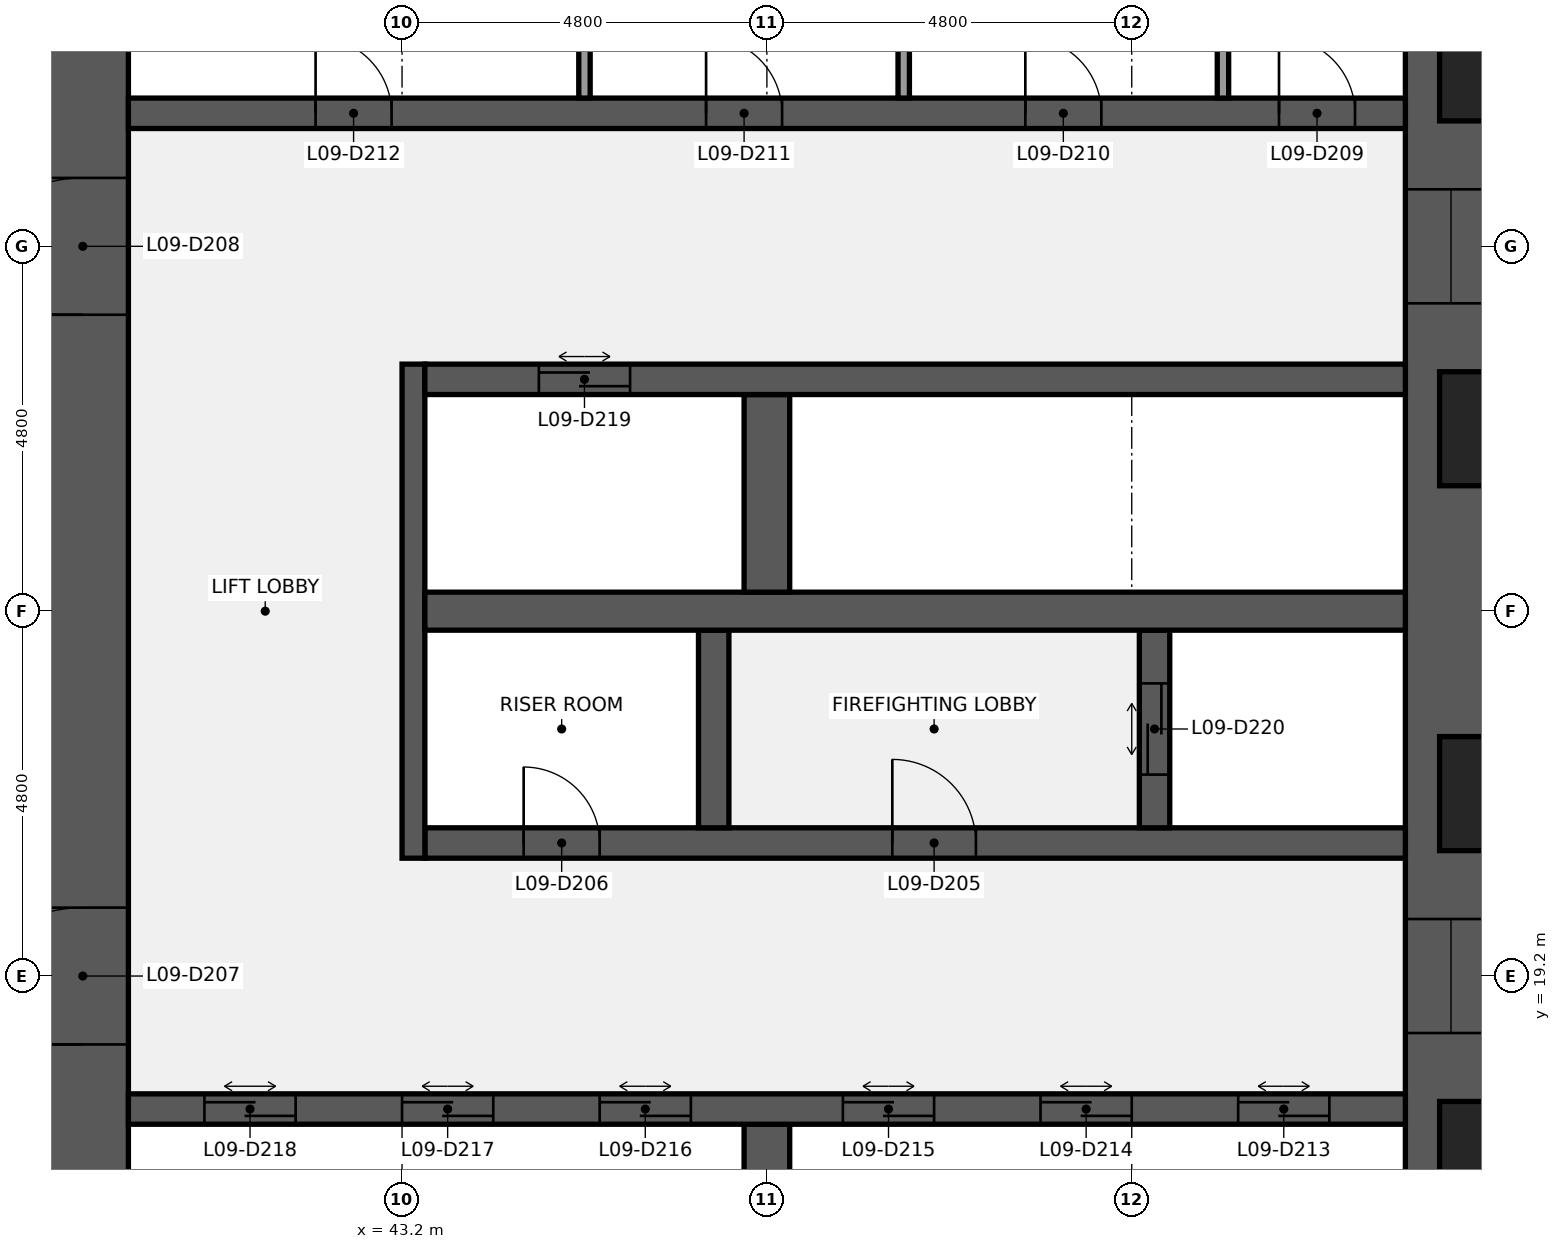
"""IFC4 building model, lengths in metres.
Left out: names, types, materials, properties, quantities, classifications, styles, units other than length and angle.
Written with IfcOpenShell. Run it as: python <this file> out.ifc"""

import sys

from ifc_helpers import new_model, si_unit, direction, frame, frame_2d, origin, place, context, subcontext, project, spatial, rectangle, extrude, element, fill, save


model = new_model("IFC4")
c1 = context("Model", 3, precision=1e-05, world=origin(), true_north=direction((0.0, 1.0)))
c2 = subcontext(c1, "Body", "Model", "MODEL_VIEW")
j1 = project(units=[si_unit("LENGTHUNIT", "METRE"), si_unit("PLANEANGLEUNIT", "RADIAN")], contexts=[c1])
p1 = place(None, origin())
s1 = spatial("IfcSite", under=j1, at=p1, CompositionType="ELEMENT")
p2 = place(p1, origin())
s2 = spatial("IfcBuilding", under=s1, at=p2, CompositionType="ELEMENT")
p3 = place(p2, frame((0.0, 0.0, 47.0)))
s3 = spatial("IfcBuildingStorey", under=s2, at=p3, CompositionType="ELEMENT", Elevation=47.0)
p4 = place(p3, frame((57.0, 38.4, 0.0), z_axis=(0.0, 0.0, 1.0), x_axis=(0.0, -1.0, 0.0)))
e1 = element("IfcWall", 1, at=p4, inside=s3, PredefinedType="SHEAR", context=c2, shape_type="SweptSolid", body=[
    extrude(rectangle(XDim=28.8, YDim=1.2, at=frame_2d((14.4, 0.0))), origin(), (0.0, 0.0, 1.0), 3.84),
])
p5 = place(p4, frame((18.45, 0.0, 0.9)))
e2 = element("IfcOpeningElement", 2, at=p5, cuts=e1, PredefinedType="OPENING", context=c2, shape_type="SweptSolid", body=[
    extrude(rectangle(XDim=1.5, YDim=1.5, at=frame_2d((0.75, 0.75))), frame((0.0, 0.61, 0.0), z_axis=(0.0, -1.0, 0.0), x_axis=(1.0, 0.0, 0.0)), (0.0, 0.0, 1.0), 1.22),
])
p6 = place(p4, frame((8.85, 0.0, 0.9)))
e3 = element("IfcOpeningElement", 3, at=p6, cuts=e1, PredefinedType="OPENING", context=c2, shape_type="SweptSolid", body=[
    extrude(rectangle(XDim=1.5, YDim=1.5, at=frame_2d((0.75, 0.75))), frame((0.0, 0.61, 0.0), z_axis=(0.0, -1.0, 0.0), x_axis=(1.0, 0.0, 0.0)), (0.0, 0.0, 1.0), 1.22),
])
p7 = place(p3, frame((39.0, 9.6, 0.0), z_axis=(0.0, 0.0, 1.0), x_axis=(0.0, 1.0, 0.0)))
e4 = element("IfcWall", 4, at=p7, inside=s3, PredefinedType="SHEAR", context=c2, shape_type="SweptSolid", body=[
    extrude(rectangle(XDim=28.8, YDim=1.2, at=frame_2d((14.4, 0.0))), origin(), (0.0, 0.0, 1.0), 3.84),
])
p8 = place(p7, frame((8.7, 0.0, 0.0)))
e5 = element("IfcOpeningElement", 5, at=p8, cuts=e4, PredefinedType="OPENING", context=c2, shape_type="SweptSolid", body=[
    extrude(rectangle(XDim=1.8, YDim=2.1, at=frame_2d((0.9, 1.05))), frame((0.0, 0.61, 0.0), z_axis=(0.0, -1.0, 0.0), x_axis=(1.0, 0.0, 0.0)), (0.0, 0.0, 1.0), 1.22),
])
p9 = place(p7, frame((18.3, 0.0, 0.0)))
e6 = element("IfcOpeningElement", 6, at=p9, cuts=e4, PredefinedType="OPENING", context=c2, shape_type="SweptSolid", body=[
    extrude(rectangle(XDim=1.8, YDim=2.1, at=frame_2d((0.9, 1.05))), frame((0.0, 0.61, 0.0), z_axis=(0.0, -1.0, 0.0), x_axis=(1.0, 0.0, 0.0)), (0.0, 0.0, 1.0), 1.22),
])
p10 = place(p3, frame((48.0, 14.65, 0.0), z_axis=(0.0, 0.0, 1.0), x_axis=(0.0, 1.0, 0.0)))
e7 = element("IfcWall", 7, at=p10, inside=s3, PredefinedType="SHEAR", context=c2, shape_type="SweptSolid", body=[
    extrude(rectangle(XDim=2.6, YDim=0.6, at=frame_2d((1.3, 0.0))), origin(), (0.0, 0.0, 1.0), 3.84),
])
p11 = place(p3, frame((39.6, 17.45, 0.0), z_axis=(0.0, 0.0, 1.0), x_axis=(1.0, 0.0, 0.0)))
e8 = element("IfcWall", 8, at=p11, inside=s3, PredefinedType="SHEAR", context=c2, shape_type="SweptSolid", body=[
    extrude(rectangle(XDim=16.8, YDim=0.4, at=frame_2d((8.4, 0.0))), origin(), (0.0, 0.0, 1.0), 3.84),
])
p12 = place(p11, frame((14.6, 0.0, 0.0)))
e9 = element("IfcOpeningElement", 9, at=p12, cuts=e8, PredefinedType="OPENING", context=c2, shape_type="SweptSolid", body=[
    extrude(rectangle(XDim=1.2, YDim=2.1, at=frame_2d((0.6, 1.05))), frame((0.0, 0.21, 0.0), z_axis=(0.0, -1.0, 0.0), x_axis=(1.0, 0.0, 0.0)), (0.0, 0.0, 1.0), 0.42),
])
p13 = place(p11, frame((12.0, 0.0, 0.0)))
e10 = element("IfcOpeningElement", 10, at=p13, cuts=e8, PredefinedType="OPENING", context=c2, shape_type="SweptSolid", body=[
    extrude(rectangle(XDim=1.2, YDim=2.1, at=frame_2d((0.6, 1.05))), frame((0.0, 0.21, 0.0), z_axis=(0.0, -1.0, 0.0), x_axis=(1.0, 0.0, 0.0)), (0.0, 0.0, 1.0), 0.42),
])
p14 = place(p11, frame((9.4, 0.0, 0.0)))
e11 = element("IfcOpeningElement", 11, at=p14, cuts=e8, PredefinedType="OPENING", context=c2, shape_type="SweptSolid", body=[
    extrude(rectangle(XDim=1.2, YDim=2.1, at=frame_2d((0.6, 1.05))), frame((0.0, 0.21, 0.0), z_axis=(0.0, -1.0, 0.0), x_axis=(1.0, 0.0, 0.0)), (0.0, 0.0, 1.0), 0.42),
])
p15 = place(p11, frame((6.2, 0.0, 0.0)))
e12 = element("IfcOpeningElement", 12, at=p15, cuts=e8, PredefinedType="OPENING", context=c2, shape_type="SweptSolid", body=[
    extrude(rectangle(XDim=1.2, YDim=2.1, at=frame_2d((0.6, 1.05))), frame((0.0, 0.21, 0.0), z_axis=(0.0, -1.0, 0.0), x_axis=(1.0, 0.0, 0.0)), (0.0, 0.0, 1.0), 0.42),
])
p16 = place(p11, frame((3.6, 0.0, 0.0)))
e13 = element("IfcOpeningElement", 13, at=p16, cuts=e8, PredefinedType="OPENING", context=c2, shape_type="SweptSolid", body=[
    extrude(rectangle(XDim=1.2, YDim=2.1, at=frame_2d((0.6, 1.05))), frame((0.0, 0.21, 0.0), z_axis=(0.0, -1.0, 0.0), x_axis=(1.0, 0.0, 0.0)), (0.0, 0.0, 1.0), 0.42),
])
p17 = place(p11, frame((1.0, 0.0, 0.0)))
e14 = element("IfcOpeningElement", 14, at=p17, cuts=e8, PredefinedType="OPENING", context=c2, shape_type="SweptSolid", body=[
    extrude(rectangle(XDim=1.2, YDim=2.1, at=frame_2d((0.6, 1.05))), frame((0.0, 0.21, 0.0), z_axis=(0.0, -1.0, 0.0), x_axis=(1.0, 0.0, 0.0)), (0.0, 0.0, 1.0), 0.42),
])
p18 = place(p3, frame((43.5, 20.95, 0.0), z_axis=(0.0, 0.0, 1.0), x_axis=(1.0, 0.0, 0.0)))
e15 = element("IfcWall", 15, at=p18, inside=s3, PredefinedType="SHEAR", context=c2, shape_type="SweptSolid", body=[
    extrude(rectangle(XDim=12.9, YDim=0.4, at=frame_2d((6.45, 0.0))), origin(), (0.0, 0.0, 1.0), 3.84),
])
p19 = place(p18, frame((6.15, 0.0, 0.0)))
e16 = element("IfcOpeningElement", 16, at=p19, cuts=e15, PredefinedType="OPENING", context=c2, shape_type="SweptSolid", body=[
    extrude(rectangle(XDim=1.1, YDim=2.1, at=frame_2d((0.55, 1.05))), frame((0.0, 0.21, 0.0), z_axis=(0.0, -1.0, 0.0), x_axis=(1.0, 0.0, 0.0)), (0.0, 0.0, 1.0), 0.42),
])
p20 = place(p18, frame((1.3, 0.0, 0.0)))
e17 = element("IfcOpeningElement", 17, at=p20, cuts=e15, PredefinedType="OPENING", context=c2, shape_type="SweptSolid", body=[
    extrude(rectangle(XDim=1.0, YDim=2.1, at=frame_2d((0.5, 1.05))), frame((0.0, 0.21, 0.0), z_axis=(0.0, -1.0, 0.0), x_axis=(1.0, 0.0, 0.0)), (0.0, 0.0, 1.0), 0.42),
])
p21 = place(p3, frame((43.35, 20.75, 0.0), z_axis=(0.0, 0.0, 1.0), x_axis=(0.0, 1.0, 0.0)))
e18 = element("IfcWall", 18, at=p21, inside=s3, PredefinedType="SHEAR", context=c2, shape_type="SweptSolid", body=[
    extrude(rectangle(XDim=6.5, YDim=0.3, at=frame_2d((3.25, 0.0))), origin(), (0.0, 0.0, 1.0), 3.84),
])
p22 = place(p3, frame((53.1, 21.15, 0.0), z_axis=(0.0, 0.0, 1.0), x_axis=(0.0, 1.0, 0.0)))
e19 = element("IfcWall", 19, at=p22, inside=s3, PredefinedType="SHEAR", context=c2, shape_type="SweptSolid", body=[
    extrude(rectangle(XDim=2.6, YDim=0.4, at=frame_2d((1.3, 0.0))), origin(), (0.0, 0.0, 1.0), 3.84),
])
p23 = place(p22, frame((0.7, 0.0, 0.0)))
e20 = element("IfcOpeningElement", 20, at=p23, cuts=e19, PredefinedType="OPENING", context=c2, shape_type="SweptSolid", body=[
    extrude(rectangle(XDim=1.2, YDim=2.1, at=frame_2d((0.6, 1.05))), frame((0.0, 0.21, 0.0), z_axis=(0.0, -1.0, 0.0), x_axis=(1.0, 0.0, 0.0)), (0.0, 0.0, 1.0), 0.42),
])
p24 = place(p3, frame((47.3, 21.15, 0.0), z_axis=(0.0, 0.0, 1.0), x_axis=(0.0, 1.0, 0.0)))
e21 = element("IfcWall", 21, at=p24, inside=s3, PredefinedType="SHEAR", context=c2, shape_type="SweptSolid", body=[
    extrude(rectangle(XDim=2.6, YDim=0.4, at=frame_2d((1.3, 0.0))), origin(), (0.0, 0.0, 1.0), 3.84),
])
p25 = place(p3, frame((43.5, 24.0, 0.0), z_axis=(0.0, 0.0, 1.0), x_axis=(1.0, 0.0, 0.0)))
e22 = element("IfcWall", 22, at=p25, inside=s3, PredefinedType="SHEAR", context=c2, shape_type="SweptSolid", body=[
    extrude(rectangle(XDim=12.9, YDim=0.5, at=frame_2d((6.45, 0.0))), origin(), (0.0, 0.0, 1.0), 3.84),
])
p26 = place(p3, frame((48.0, 24.25, 0.0), z_axis=(0.0, 0.0, 1.0), x_axis=(0.0, 1.0, 0.0)))
e23 = element("IfcWall", 23, at=p26, inside=s3, PredefinedType="SHEAR", context=c2, shape_type="SweptSolid", body=[
    extrude(rectangle(XDim=2.6, YDim=0.6, at=frame_2d((1.3, 0.0))), origin(), (0.0, 0.0, 1.0), 3.84),
])
p27 = place(p3, frame((43.5, 27.05, 0.0), z_axis=(0.0, 0.0, 1.0), x_axis=(1.0, 0.0, 0.0)))
e24 = element("IfcWall", 24, at=p27, inside=s3, PredefinedType="SHEAR", context=c2, shape_type="SweptSolid", body=[
    extrude(rectangle(XDim=12.9, YDim=0.4, at=frame_2d((6.45, 0.0))), origin(), (0.0, 0.0, 1.0), 3.84),
])
p28 = place(p27, frame((1.5, 0.0, 0.0)))
e25 = element("IfcOpeningElement", 25, at=p28, cuts=e24, PredefinedType="OPENING", context=c2, shape_type="SweptSolid", body=[
    extrude(rectangle(XDim=1.2, YDim=2.1, at=frame_2d((0.6, 1.05))), frame((0.0, 0.21, 0.0), z_axis=(0.0, -1.0, 0.0), x_axis=(1.0, 0.0, 0.0)), (0.0, 0.0, 1.0), 0.42),
])
p29 = place(p3, frame((39.6, 30.55, 0.0), z_axis=(0.0, 0.0, 1.0), x_axis=(1.0, 0.0, 0.0)))
e26 = element("IfcWall", 26, at=p29, inside=s3, PredefinedType="SHEAR", context=c2, shape_type="SweptSolid", body=[
    extrude(rectangle(XDim=16.8, YDim=0.4, at=frame_2d((8.4, 0.0))), origin(), (0.0, 0.0, 1.0), 3.84),
])
p30 = place(p29, frame((15.137, 0.0, 0.0)))
e27 = element("IfcOpeningElement", 27, at=p30, cuts=e26, PredefinedType="OPENING", context=c2, shape_type="SweptSolid", body=[
    extrude(rectangle(XDim=1.0, YDim=2.1, at=frame_2d((0.5, 1.05))), frame((0.0, 0.21, 0.0), z_axis=(0.0, -1.0, 0.0), x_axis=(1.0, 0.0, 0.0)), (0.0, 0.0, 1.0), 0.42),
])
p31 = place(p29, frame((11.8, 0.0, 0.0)))
e28 = element("IfcOpeningElement", 28, at=p31, cuts=e26, PredefinedType="OPENING", context=c2, shape_type="SweptSolid", body=[
    extrude(rectangle(XDim=1.0, YDim=2.1, at=frame_2d((0.5, 1.05))), frame((0.0, 0.21, 0.0), z_axis=(0.0, -1.0, 0.0), x_axis=(1.0, 0.0, 0.0)), (0.0, 0.0, 1.0), 0.42),
])
p32 = place(p29, frame((7.6, 0.0, 0.0)))
e29 = element("IfcOpeningElement", 29, at=p32, cuts=e26, PredefinedType="OPENING", context=c2, shape_type="SweptSolid", body=[
    extrude(rectangle(XDim=1.0, YDim=2.1, at=frame_2d((0.5, 1.05))), frame((0.0, 0.21, 0.0), z_axis=(0.0, -1.0, 0.0), x_axis=(1.0, 0.0, 0.0)), (0.0, 0.0, 1.0), 0.42),
])
p33 = place(p29, frame((2.462, 0.0, 0.0)))
e30 = element("IfcOpeningElement", 30, at=p33, cuts=e26, PredefinedType="OPENING", context=c2, shape_type="SweptSolid", body=[
    extrude(rectangle(XDim=1.0, YDim=2.1, at=frame_2d((0.5, 1.05))), frame((0.0, 0.21, 0.0), z_axis=(0.0, -1.0, 0.0), x_axis=(1.0, 0.0, 0.0)), (0.0, 0.0, 1.0), 0.42),
])
for number, where, z_axis, x_axis in (
    (31, (54.0, 30.75, 0.0), (0.0, 0.0, 1.0), (0.0, 1.0, 0.0)),
    (32, (49.8, 30.75, 0.0), (0.0, 0.0, 1.0), (0.0, 1.0, 0.0)),
    (33, (45.6, 30.75, 0.0), (0.0, 0.0, 1.0), (0.0, 1.0, 0.0)),
):
    element("IfcWall", number, at=place(p3, frame(where, z_axis=z_axis, x_axis=x_axis)), inside=s3, PredefinedType="PARTITIONING", context=c2, shape_type="SweptSolid", body=[
        extrude(rectangle(XDim=2.6, YDim=0.15, at=frame_2d((1.3, 0.0))), origin(), (0.0, 0.0, 1.0), 3.84),
    ])
p34 = place(p19, origin())
e34 = element("IfcDoor", 34, at=p34, inside=s3, OperationType="SINGLE_SWING_LEFT", PredefinedType="DOOR", context=c2, shape_type="SweptSolid", body=[
    extrude(rectangle(XDim=1.1, YDim=2.1, at=frame_2d((0.55, 1.05))), frame((0.0, 0.025, 0.0), z_axis=(0.0, -1.0, 0.0), x_axis=(1.0, 0.0, 0.0)), (0.0, 0.0, 1.0), 0.05),
])
fill(e16, e34)
p35 = place(p20, origin())
e35 = element("IfcDoor", 35, at=p35, inside=s3, OperationType="SINGLE_SWING_LEFT", PredefinedType="DOOR", context=c2, shape_type="SweptSolid", body=[
    extrude(rectangle(XDim=1.0, YDim=2.1, at=frame_2d((0.5, 1.05))), frame((0.0, 0.025, 0.0), z_axis=(0.0, -1.0, 0.0), x_axis=(1.0, 0.0, 0.0)), (0.0, 0.0, 1.0), 0.05),
])
fill(e17, e35)
p36 = place(p8, origin())
e36 = element("IfcDoor", 36, at=p36, inside=s3, OperationType="DOUBLE_DOOR_SINGLE_SWING", PredefinedType="DOOR", context=c2, shape_type="SweptSolid", body=[
    extrude(rectangle(XDim=1.8, YDim=2.1, at=frame_2d((0.9, 1.05))), frame((0.0, 0.025, 0.0), z_axis=(0.0, -1.0, 0.0), x_axis=(1.0, 0.0, 0.0)), (0.0, 0.0, 1.0), 0.05),
])
fill(e5, e36)
p37 = place(p9, origin())
e37 = element("IfcDoor", 37, at=p37, inside=s3, OperationType="DOUBLE_DOOR_SINGLE_SWING", PredefinedType="DOOR", context=c2, shape_type="SweptSolid", body=[
    extrude(rectangle(XDim=1.8, YDim=2.1, at=frame_2d((0.9, 1.05))), frame((0.0, 0.025, 0.0), z_axis=(0.0, -1.0, 0.0), x_axis=(1.0, 0.0, 0.0)), (0.0, 0.0, 1.0), 0.05),
])
fill(e6, e37)
p38 = place(p30, origin())
e38 = element("IfcDoor", 38, at=p38, inside=s3, OperationType="SINGLE_SWING_LEFT", PredefinedType="DOOR", context=c2, shape_type="SweptSolid", body=[
    extrude(rectangle(XDim=1.0, YDim=2.1, at=frame_2d((0.5, 1.05))), frame((0.0, 0.025, 0.0), z_axis=(0.0, -1.0, 0.0), x_axis=(1.0, 0.0, 0.0)), (0.0, 0.0, 1.0), 0.05),
])
fill(e27, e38)
p39 = place(p31, origin())
e39 = element("IfcDoor", 39, at=p39, inside=s3, OperationType="SINGLE_SWING_LEFT", PredefinedType="DOOR", context=c2, shape_type="SweptSolid", body=[
    extrude(rectangle(XDim=1.0, YDim=2.1, at=frame_2d((0.5, 1.05))), frame((0.0, 0.025, 0.0), z_axis=(0.0, -1.0, 0.0), x_axis=(1.0, 0.0, 0.0)), (0.0, 0.0, 1.0), 0.05),
])
fill(e28, e39)
p40 = place(p32, origin())
e40 = element("IfcDoor", 40, at=p40, inside=s3, OperationType="SINGLE_SWING_LEFT", PredefinedType="DOOR", context=c2, shape_type="SweptSolid", body=[
    extrude(rectangle(XDim=1.0, YDim=2.1, at=frame_2d((0.5, 1.05))), frame((0.0, 0.025, 0.0), z_axis=(0.0, -1.0, 0.0), x_axis=(1.0, 0.0, 0.0)), (0.0, 0.0, 1.0), 0.05),
])
fill(e29, e40)
p41 = place(p33, origin())
e41 = element("IfcDoor", 41, at=p41, inside=s3, OperationType="SINGLE_SWING_LEFT", PredefinedType="DOOR", context=c2, shape_type="SweptSolid", body=[
    extrude(rectangle(XDim=1.0, YDim=2.1, at=frame_2d((0.5, 1.05))), frame((0.0, 0.025, 0.0), z_axis=(0.0, -1.0, 0.0), x_axis=(1.0, 0.0, 0.0)), (0.0, 0.0, 1.0), 0.05),
])
fill(e30, e41)
p42 = place(p12, origin())
e42 = element("IfcDoor", 42, at=p42, inside=s3, OperationType="DOUBLE_DOOR_SLIDING", PredefinedType="DOOR", context=c2, shape_type="SweptSolid", body=[
    extrude(rectangle(XDim=1.2, YDim=2.1, at=frame_2d((0.6, 1.05))), frame((0.0, 0.025, 0.0), z_axis=(0.0, -1.0, 0.0), x_axis=(1.0, 0.0, 0.0)), (0.0, 0.0, 1.0), 0.05),
])
fill(e9, e42)
p43 = place(p13, origin())
e43 = element("IfcDoor", 43, at=p43, inside=s3, OperationType="DOUBLE_DOOR_SLIDING", PredefinedType="DOOR", context=c2, shape_type="SweptSolid", body=[
    extrude(rectangle(XDim=1.2, YDim=2.1, at=frame_2d((0.6, 1.05))), frame((0.0, 0.025, 0.0), z_axis=(0.0, -1.0, 0.0), x_axis=(1.0, 0.0, 0.0)), (0.0, 0.0, 1.0), 0.05),
])
fill(e10, e43)
p44 = place(p14, origin())
e44 = element("IfcDoor", 44, at=p44, inside=s3, OperationType="DOUBLE_DOOR_SLIDING", PredefinedType="DOOR", context=c2, shape_type="SweptSolid", body=[
    extrude(rectangle(XDim=1.2, YDim=2.1, at=frame_2d((0.6, 1.05))), frame((0.0, 0.025, 0.0), z_axis=(0.0, -1.0, 0.0), x_axis=(1.0, 0.0, 0.0)), (0.0, 0.0, 1.0), 0.05),
])
fill(e11, e44)
p45 = place(p15, origin())
e45 = element("IfcDoor", 45, at=p45, inside=s3, OperationType="DOUBLE_DOOR_SLIDING", PredefinedType="DOOR", context=c2, shape_type="SweptSolid", body=[
    extrude(rectangle(XDim=1.2, YDim=2.1, at=frame_2d((0.6, 1.05))), frame((0.0, 0.025, 0.0), z_axis=(0.0, -1.0, 0.0), x_axis=(1.0, 0.0, 0.0)), (0.0, 0.0, 1.0), 0.05),
])
fill(e12, e45)
p46 = place(p16, origin())
e46 = element("IfcDoor", 46, at=p46, inside=s3, OperationType="DOUBLE_DOOR_SLIDING", PredefinedType="DOOR", context=c2, shape_type="SweptSolid", body=[
    extrude(rectangle(XDim=1.2, YDim=2.1, at=frame_2d((0.6, 1.05))), frame((0.0, 0.025, 0.0), z_axis=(0.0, -1.0, 0.0), x_axis=(1.0, 0.0, 0.0)), (0.0, 0.0, 1.0), 0.05),
])
fill(e13, e46)
p47 = place(p17, origin())
e47 = element("IfcDoor", 47, at=p47, inside=s3, OperationType="DOUBLE_DOOR_SLIDING", PredefinedType="DOOR", context=c2, shape_type="SweptSolid", body=[
    extrude(rectangle(XDim=1.2, YDim=2.1, at=frame_2d((0.6, 1.05))), frame((0.0, 0.025, 0.0), z_axis=(0.0, -1.0, 0.0), x_axis=(1.0, 0.0, 0.0)), (0.0, 0.0, 1.0), 0.05),
])
fill(e14, e47)
p48 = place(p28, origin())
e48 = element("IfcDoor", 48, at=p48, inside=s3, OperationType="DOUBLE_DOOR_SLIDING", PredefinedType="DOOR", context=c2, shape_type="SweptSolid", body=[
    extrude(rectangle(XDim=1.2, YDim=2.1, at=frame_2d((0.6, 1.05))), frame((0.0, 0.025, 0.0), z_axis=(0.0, -1.0, 0.0), x_axis=(1.0, 0.0, 0.0)), (0.0, 0.0, 1.0), 0.05),
])
fill(e25, e48)
p49 = place(p23, origin())
e49 = element("IfcDoor", 49, at=p49, inside=s3, OperationType="DOUBLE_DOOR_SLIDING", PredefinedType="DOOR", context=c2, shape_type="SweptSolid", body=[
    extrude(rectangle(XDim=1.2, YDim=2.1, at=frame_2d((0.6, 1.05))), frame((0.0, 0.025, 0.0), z_axis=(0.0, -1.0, 0.0), x_axis=(1.0, 0.0, 0.0)), (0.0, 0.0, 1.0), 0.05),
])
fill(e20, e49)
p50 = place(p5, origin())
e50 = element("IfcWindow", 50, at=p50, inside=s3, PartitioningType="SINGLE_PANEL", PredefinedType="WINDOW", context=c2, shape_type="SweptSolid", body=[
    extrude(rectangle(XDim=1.5, YDim=1.5, at=frame_2d((0.75, 0.75))), frame((0.0, 0.03, 0.0), z_axis=(0.0, -1.0, 0.0), x_axis=(1.0, 0.0, 0.0)), (0.0, 0.0, 1.0), 0.06),
])
fill(e2, e50)
p51 = place(p6, origin())
e51 = element("IfcWindow", 51, at=p51, inside=s3, PartitioningType="SINGLE_PANEL", PredefinedType="WINDOW", context=c2, shape_type="SweptSolid", body=[
    extrude(rectangle(XDim=1.5, YDim=1.5, at=frame_2d((0.75, 0.75))), frame((0.0, 0.03, 0.0), z_axis=(0.0, -1.0, 0.0), x_axis=(1.0, 0.0, 0.0)), (0.0, 0.0, 1.0), 0.06),
])
fill(e3, e51)
save(model, sys.argv[1])
